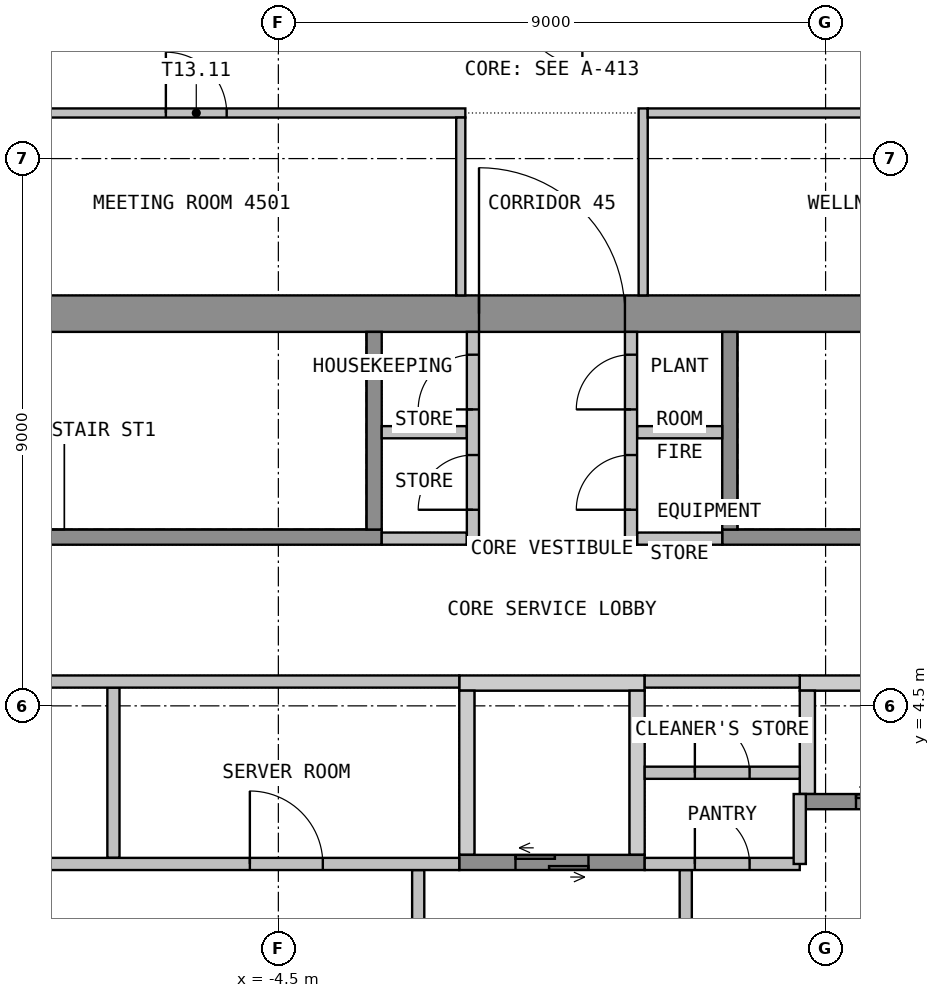
"""IFC4 building model, lengths in metres.
Left out: names, types, materials, properties, quantities, classifications, styles, units other than length and angle.
Written with IfcOpenShell. Run it as: python <this file> out.ifc"""

import sys

from ifc_helpers import new_model, si_unit, direction, frame, frame_2d, origin, place, context, subcontext, project, spatial, polyline, rectangle, outline, extrude, element, fill, save


model = new_model("IFC4")
c1 = context("Model", 3, precision=1e-05, world=origin(), true_north=direction((0.0, 1.0)))
c2 = subcontext(c1, "Body", "Model", "MODEL_VIEW")
j1 = project(units=[si_unit("LENGTHUNIT", "METRE"), si_unit("PLANEANGLEUNIT", "RADIAN")], contexts=[c1])
p1 = place(None, origin())
s1 = spatial("IfcSite", under=j1, at=p1, CompositionType="ELEMENT")
p2 = place(p1, origin())
s2 = spatial("IfcBuilding", under=s1, at=p2, CompositionType="ELEMENT")
p3 = place(p2, frame((0.0, 0.0, 183.9)))
s3 = spatial("IfcBuildingStorey", under=s2, at=p3, CompositionType="ELEMENT", Elevation=183.9)
p4 = place(p3, frame((-13.5, 10.95, 0.0), z_axis=(0.0, 0.0, 1.0), x_axis=(1.0, 0.0, 0.0)))
e1 = element("IfcWall", 1, at=p4, inside=s3, PredefinedType="SHEAR", context=c2, shape_type="SweptSolid", body=[
    extrude(rectangle(XDim=27.0, YDim=0.6, at=frame_2d((13.5, 0.0))), origin(), (0.0, 0.0, 1.0), 3.55),
])
p5 = place(p4, frame((12.3, 0.0, 0.0)))
e2 = element("IfcOpeningElement", 2, at=p5, cuts=e1, PredefinedType="OPENING", context=c2, shape_type="SweptSolid", body=[
    extrude(rectangle(XDim=2.4, YDim=2.1, at=frame_2d((1.2, 1.05))), frame((0.0, 0.31, 0.0), z_axis=(0.0, -1.0, 0.0), x_axis=(1.0, 0.0, 0.0)), (0.0, 0.0, 1.0), 0.62),
])
p6 = place(p4, frame((1.05, 0.0, 0.0)))
e3 = element("IfcOpeningElement", 3, at=p6, cuts=e1, PredefinedType="OPENING", context=c2, shape_type="SweptSolid", body=[
    extrude(rectangle(XDim=1.2, YDim=2.1, at=frame_2d((0.6, 1.05))), frame((0.0, 0.31, 0.0), z_axis=(0.0, -1.0, 0.0), x_axis=(1.0, 0.0, 0.0)), (0.0, 0.0, 1.0), 0.62),
])
p7 = place(p4, frame((24.75, 0.0, 0.0)))
e4 = element("IfcOpeningElement", 4, at=p7, cuts=e1, PredefinedType="OPENING", context=c2, shape_type="SweptSolid", body=[
    extrude(rectangle(XDim=1.2, YDim=2.1, at=frame_2d((0.6, 1.05))), frame((0.0, 0.31, 0.0), z_axis=(0.0, -1.0, 0.0), x_axis=(1.0, 0.0, 0.0)), (0.0, 0.0, 1.0), 0.62),
])
p8 = place(p3, origin())
e5 = element("IfcWall", 5, at=p8, inside=s3, PredefinedType="SHEAR", context=c2, shape_type="SweptSolid", body=[
    extrude(outline(polyline([(-1.525, 4.75), (1.525, 4.75), (1.525, 5.0), (-1.525, 5.0), (-1.525, 4.75)])), origin(), (0.0, 0.0, 1.0), 3.55),
])
p9 = place(p3, origin())
e6 = element("IfcWall", 6, at=p9, inside=s3, PredefinedType="SHEAR", context=c2, shape_type="SweptSolid", body=[
    extrude(outline(polyline([(4.075, 4.75), (12.9, 4.75), (12.9, 5.0), (4.075, 5.0), (4.075, 4.75)])), origin(), (0.0, 0.0, 1.0), 3.55),
])
p10 = place(p3, origin())
e7 = element("IfcWall", 7, at=p10, inside=s3, PredefinedType="SHEAR", context=c2, shape_type="SweptSolid", body=[
    extrude(outline(polyline([(-1.525, 2.05), (-1.275, 2.05), (-1.275, 4.75), (-1.525, 4.75), (-1.525, 2.05)])), origin(), (0.0, 0.0, 1.0), 3.55),
])
p11 = place(p3, origin())
e8 = element("IfcWall", 8, at=p11, inside=s3, PredefinedType="SHEAR", context=c2, shape_type="SweptSolid", body=[
    extrude(outline(polyline([(1.275, 2.05), (1.525, 2.05), (1.525, 4.75), (1.275, 4.75), (1.275, 2.05)])), origin(), (0.0, 0.0, 1.0), 3.55),
])
p12 = place(p3, origin())
e9 = element("IfcWall", 9, at=p12, inside=s3, PredefinedType="SHEAR", context=c2, shape_type="SweptSolid", body=[
    extrude(outline(polyline([(4.075, 3.05), (4.325, 3.05), (4.325, 4.75), (4.075, 4.75), (4.075, 3.05)])), origin(), (0.0, 0.0, 1.0), 3.55),
])
p13 = place(p3, frame((-1.525, 1.925, 0.0), z_axis=(0.0, 0.0, 1.0), x_axis=(1.0, 0.0, 0.0)))
e10 = element("IfcWall", 10, at=p13, inside=s3, PredefinedType="SHEAR", context=c2, shape_type="SweptSolid", body=[
    extrude(rectangle(XDim=3.05, YDim=0.25, at=frame_2d((1.525, 0.0))), origin(), (0.0, 0.0, 1.0), 3.55),
])
p14 = place(p13, frame((0.925, 0.0, 0.0)))
e11 = element("IfcOpeningElement", 11, at=p14, cuts=e10, PredefinedType="OPENING", context=c2, shape_type="SweptSolid", body=[
    extrude(rectangle(XDim=1.2, YDim=2.1, at=frame_2d((0.6, 1.05))), frame((0.0, 0.135, 0.0), z_axis=(0.0, -1.0, 0.0), x_axis=(1.0, 0.0, 0.0)), (0.0, 0.0, 1.0), 0.27),
])
p15 = place(p3, frame((4.075, 2.925, 0.0), z_axis=(0.0, 0.0, 1.0), x_axis=(1.0, 0.0, 0.0)))
e12 = element("IfcWall", 12, at=p15, inside=s3, PredefinedType="SHEAR", context=c2, shape_type="SweptSolid", body=[
    extrude(rectangle(XDim=5.85, YDim=0.25, at=frame_2d((2.925, 0.0))), origin(), (0.0, 0.0, 1.0), 3.55),
])
p16 = place(p15, frame((0.925, 0.0, 0.0)))
e13 = element("IfcOpeningElement", 13, at=p16, cuts=e12, PredefinedType="OPENING", context=c2, shape_type="SweptSolid", body=[
    extrude(rectangle(XDim=1.2, YDim=2.1, at=frame_2d((0.6, 1.05))), frame((0.0, 0.135, 0.0), z_axis=(0.0, -1.0, 0.0), x_axis=(1.0, 0.0, 0.0)), (0.0, 0.0, 1.0), 0.27),
])
p17 = place(p15, frame((3.725, 0.0, 0.0)))
e14 = element("IfcOpeningElement", 14, at=p17, cuts=e12, PredefinedType="OPENING", context=c2, shape_type="SweptSolid", body=[
    extrude(rectangle(XDim=1.2, YDim=2.1, at=frame_2d((0.6, 1.05))), frame((0.0, 0.135, 0.0), z_axis=(0.0, -1.0, 0.0), x_axis=(1.0, 0.0, 0.0)), (0.0, 0.0, 1.0), 0.27),
])
p18 = place(p3, frame((-2.2, -1.8, 0.0), z_axis=(0.0, 0.0, 1.0), x_axis=(0.0, 1.0, 0.0)))
e15 = element("IfcWall", 15, at=p18, inside=s3, PredefinedType="PARTITIONING", context=c2, shape_type="SweptSolid", body=[
    extrude(rectangle(XDim=3.6, YDim=0.2, at=frame_2d((1.8, 0.0))), origin(), (0.0, 0.0, 1.0), 3.55),
])
p19 = place(p18, frame((1.2, 0.0, 0.0)))
e16 = element("IfcOpeningElement", 16, at=p19, cuts=e15, PredefinedType="OPENING", context=c2, shape_type="SweptSolid", body=[
    extrude(rectangle(XDim=1.2, YDim=2.1, at=frame_2d((0.6, 1.05))), frame((0.0, 0.11, 0.0), z_axis=(0.0, -1.0, 0.0), x_axis=(1.0, 0.0, 0.0)), (0.0, 0.0, 1.0), 0.22),
])
p20 = place(p3, frame((2.2, -1.8, 0.0), z_axis=(0.0, 0.0, 1.0), x_axis=(0.0, 1.0, 0.0)))
e17 = element("IfcWall", 17, at=p20, inside=s3, PredefinedType="PARTITIONING", context=c2, shape_type="SweptSolid", body=[
    extrude(rectangle(XDim=3.6, YDim=0.2, at=frame_2d((1.8, 0.0))), origin(), (0.0, 0.0, 1.0), 3.55),
])
p21 = place(p20, frame((1.2, 0.0, 0.0)))
e18 = element("IfcOpeningElement", 18, at=p21, cuts=e17, PredefinedType="OPENING", context=c2, shape_type="SweptSolid", body=[
    extrude(rectangle(XDim=1.2, YDim=2.1, at=frame_2d((0.6, 1.05))), frame((0.0, 0.11, 0.0), z_axis=(0.0, -1.0, 0.0), x_axis=(1.0, 0.0, 0.0)), (0.0, 0.0, 1.0), 0.22),
])
p22 = place(p3, frame((-12.9, 7.275, 0.0), z_axis=(0.0, 0.0, 1.0), x_axis=(1.0, 0.0, 0.0)))
e19 = element("IfcWall", 19, at=p22, inside=s3, PredefinedType="SHEAR", context=c2, shape_type="SweptSolid", body=[
    extrude(rectangle(XDim=10.1, YDim=0.25, at=frame_2d((5.05, 0.0))), origin(), (0.0, 0.0, 1.0), 3.55),
])
p23 = place(p22, frame((0.45, 0.0, 0.0)))
e20 = element("IfcOpeningElement", 20, at=p23, cuts=e19, PredefinedType="OPENING", context=c2, shape_type="SweptSolid", body=[
    extrude(rectangle(XDim=1.2, YDim=2.1, at=frame_2d((0.6, 1.05))), frame((0.0, 0.135, 0.0), z_axis=(0.0, -1.0, 0.0), x_axis=(1.0, 0.0, 0.0)), (0.0, 0.0, 1.0), 0.27),
])
p24 = place(p3, frame((-2.925, 7.4, 0.0), z_axis=(0.0, 0.0, 1.0), x_axis=(0.0, 1.0, 0.0)))
e21 = element("IfcWall", 21, at=p24, inside=s3, PredefinedType="SHEAR", context=c2, shape_type="SweptSolid", body=[
    extrude(rectangle(XDim=3.25, YDim=0.25, at=frame_2d((1.625, 0.0))), origin(), (0.0, 0.0, 1.0), 3.55),
])
p25 = place(p3, frame((2.8, 7.275, 0.0), z_axis=(0.0, 0.0, 1.0), x_axis=(1.0, 0.0, 0.0)))
e22 = element("IfcWall", 22, at=p25, inside=s3, PredefinedType="SHEAR", context=c2, shape_type="SweptSolid", body=[
    extrude(rectangle(XDim=10.1, YDim=0.25, at=frame_2d((5.05, 0.0))), origin(), (0.0, 0.0, 1.0), 3.55),
])
p26 = place(p25, frame((8.45, 0.0, 0.0)))
e23 = element("IfcOpeningElement", 23, at=p26, cuts=e22, PredefinedType="OPENING", context=c2, shape_type="SweptSolid", body=[
    extrude(rectangle(XDim=1.2, YDim=2.1, at=frame_2d((0.6, 1.05))), frame((0.0, 0.135, 0.0), z_axis=(0.0, -1.0, 0.0), x_axis=(1.0, 0.0, 0.0)), (0.0, 0.0, 1.0), 0.27),
])
p27 = place(p3, frame((2.925, 7.4, 0.0), z_axis=(0.0, 0.0, 1.0), x_axis=(0.0, 1.0, 0.0)))
e24 = element("IfcWall", 24, at=p27, inside=s3, PredefinedType="SHEAR", context=c2, shape_type="SweptSolid", body=[
    extrude(rectangle(XDim=3.25, YDim=0.25, at=frame_2d((1.625, 0.0))), origin(), (0.0, 0.0, 1.0), 3.55),
])
for number, where, z_axis, x_axis in (
    (25, (-2.8, 7.25, 0.0), (0.0, 0.0, 1.0), (1.0, 0.0, 0.0)),
    (26, (-2.8, 9.0, 0.0), (0.0, 0.0, 1.0), (1.0, 0.0, 0.0)),
    (27, (1.4, 7.25, 0.0), (0.0, 0.0, 1.0), (1.0, 0.0, 0.0)),
    (28, (1.4, 9.0, 0.0), (0.0, 0.0, 1.0), (1.0, 0.0, 0.0)),
):
    element("IfcWall", number, at=place(p3, frame(where, z_axis=z_axis, x_axis=x_axis)), inside=s3, PredefinedType="PARTITIONING", context=c2, shape_type="SweptSolid", body=[
        extrude(rectangle(XDim=1.4, YDim=0.2, at=frame_2d((0.7, 0.0))), origin(), (0.0, 0.0, 1.0), 3.55),
    ])
p28 = place(p3, frame((-1.3, 7.15, 0.0), z_axis=(0.0, 0.0, 1.0), x_axis=(0.0, 1.0, 0.0)))
e29 = element("IfcWall", 29, at=p28, inside=s3, PredefinedType="PARTITIONING", context=c2, shape_type="SweptSolid", body=[
    extrude(rectangle(XDim=3.5, YDim=0.2, at=frame_2d((1.75, 0.0))), origin(), (0.0, 0.0, 1.0), 3.55),
])
p29 = place(p28, frame((0.575, 0.0, 0.0)))
e30 = element("IfcOpeningElement", 30, at=p29, cuts=e29, PredefinedType="OPENING", context=c2, shape_type="SweptSolid", body=[
    extrude(rectangle(XDim=0.9, YDim=2.1, at=frame_2d((0.45, 1.05))), frame((0.0, 0.11, 0.0), z_axis=(0.0, -1.0, 0.0), x_axis=(1.0, 0.0, 0.0)), (0.0, 0.0, 1.0), 0.22),
])
p30 = place(p28, frame((2.225, 0.0, 0.0)))
e31 = element("IfcOpeningElement", 31, at=p30, cuts=e29, PredefinedType="OPENING", context=c2, shape_type="SweptSolid", body=[
    extrude(rectangle(XDim=0.9, YDim=2.1, at=frame_2d((0.45, 1.05))), frame((0.0, 0.11, 0.0), z_axis=(0.0, -1.0, 0.0), x_axis=(1.0, 0.0, 0.0)), (0.0, 0.0, 1.0), 0.22),
])
p31 = place(p3, frame((1.3, 7.15, 0.0), z_axis=(0.0, 0.0, 1.0), x_axis=(0.0, 1.0, 0.0)))
e32 = element("IfcWall", 32, at=p31, inside=s3, PredefinedType="PARTITIONING", context=c2, shape_type="SweptSolid", body=[
    extrude(rectangle(XDim=3.5, YDim=0.2, at=frame_2d((1.75, 0.0))), origin(), (0.0, 0.0, 1.0), 3.55),
])
p32 = place(p31, frame((0.575, 0.0, 0.0)))
e33 = element("IfcOpeningElement", 33, at=p32, cuts=e32, PredefinedType="OPENING", context=c2, shape_type="SweptSolid", body=[
    extrude(rectangle(XDim=0.9, YDim=2.1, at=frame_2d((0.45, 1.05))), frame((0.0, 0.11, 0.0), z_axis=(0.0, -1.0, 0.0), x_axis=(1.0, 0.0, 0.0)), (0.0, 0.0, 1.0), 0.22),
])
p33 = place(p31, frame((2.225, 0.0, 0.0)))
e34 = element("IfcOpeningElement", 34, at=p33, cuts=e32, PredefinedType="OPENING", context=c2, shape_type="SweptSolid", body=[
    extrude(rectangle(XDim=0.9, YDim=2.1, at=frame_2d((0.45, 1.05))), frame((0.0, 0.11, 0.0), z_axis=(0.0, -1.0, 0.0), x_axis=(1.0, 0.0, 0.0)), (0.0, 0.0, 1.0), 0.22),
])
p34 = place(p3, frame((-7.212, 2.0, 0.0), z_axis=(0.0, 0.0, 1.0), x_axis=(0.0, 1.0, 0.0)))
e35 = element("IfcWall", 35, at=p34, inside=s3, PredefinedType="PARTITIONING", context=c2, shape_type="SweptSolid", body=[
    extrude(rectangle(XDim=2.8, YDim=0.2, at=frame_2d((1.4, 0.0))), origin(), (0.0, 0.0, 1.0), 3.55),
])
p35 = place(p3, frame((-12.9, 1.9, 0.0), z_axis=(0.0, 0.0, 1.0), x_axis=(1.0, 0.0, 0.0)))
e36 = element("IfcWall", 36, at=p35, inside=s3, PredefinedType="PARTITIONING", context=c2, shape_type="SweptSolid", body=[
    extrude(rectangle(XDim=11.375, YDim=0.2, at=frame_2d((5.688, 0.0))), origin(), (0.0, 0.0, 1.0), 3.55),
])
p36 = place(p35, frame((2.244, 0.0, 0.0)))
e37 = element("IfcOpeningElement", 37, at=p36, cuts=e36, PredefinedType="OPENING", context=c2, shape_type="SweptSolid", body=[
    extrude(rectangle(XDim=1.2, YDim=2.1, at=frame_2d((0.6, 1.05))), frame((0.0, 0.11, 0.0), z_axis=(0.0, -1.0, 0.0), x_axis=(1.0, 0.0, 0.0)), (0.0, 0.0, 1.0), 0.22),
])
p37 = place(p35, frame((7.931, 0.0, 0.0)))
e38 = element("IfcOpeningElement", 38, at=p37, cuts=e36, PredefinedType="OPENING", context=c2, shape_type="SweptSolid", body=[
    extrude(rectangle(XDim=1.2, YDim=2.1, at=frame_2d((0.6, 1.05))), frame((0.0, 0.11, 0.0), z_axis=(0.0, -1.0, 0.0), x_axis=(1.0, 0.0, 0.0)), (0.0, 0.0, 1.0), 0.22),
])
p38 = place(p3, frame((-12.9, 4.9, 0.0), z_axis=(0.0, 0.0, 1.0), x_axis=(1.0, 0.0, 0.0)))
e39 = element("IfcWall", 39, at=p38, inside=s3, PredefinedType="PARTITIONING", context=c2, shape_type="SweptSolid", body=[
    extrude(rectangle(XDim=11.375, YDim=0.2, at=frame_2d((5.688, 0.0))), origin(), (0.0, 0.0, 1.0), 3.55),
])
p39 = place(p3, frame((1.525, 3.4, 0.0), z_axis=(0.0, 0.0, 1.0), x_axis=(1.0, 0.0, 0.0)))
e40 = element("IfcWall", 40, at=p39, inside=s3, PredefinedType="PARTITIONING", context=c2, shape_type="SweptSolid", body=[
    extrude(rectangle(XDim=2.55, YDim=0.2, at=frame_2d((1.275, 0.0))), origin(), (0.0, 0.0, 1.0), 3.55),
])
p40 = place(p39, frame((0.825, 0.0, 0.0)))
e41 = element("IfcOpeningElement", 41, at=p40, cuts=e40, PredefinedType="OPENING", context=c2, shape_type="SweptSolid", body=[
    extrude(rectangle(XDim=0.9, YDim=2.1, at=frame_2d((0.45, 1.05))), frame((0.0, 0.11, 0.0), z_axis=(0.0, -1.0, 0.0), x_axis=(1.0, 0.0, 0.0)), (0.0, 0.0, 1.0), 0.22),
])
p41 = place(p3, frame((1.525, 1.9, 0.0), z_axis=(0.0, 0.0, 1.0), x_axis=(1.0, 0.0, 0.0)))
e42 = element("IfcWall", 42, at=p41, inside=s3, PredefinedType="PARTITIONING", context=c2, shape_type="SweptSolid", body=[
    extrude(rectangle(XDim=2.55, YDim=0.2, at=frame_2d((1.275, 0.0))), origin(), (0.0, 0.0, 1.0), 3.55),
])
p42 = place(p41, frame((0.825, 0.0, 0.0)))
e43 = element("IfcOpeningElement", 43, at=p42, cuts=e42, PredefinedType="OPENING", context=c2, shape_type="SweptSolid", body=[
    extrude(rectangle(XDim=0.9, YDim=2.1, at=frame_2d((0.45, 1.05))), frame((0.0, 0.11, 0.0), z_axis=(0.0, -1.0, 0.0), x_axis=(1.0, 0.0, 0.0)), (0.0, 0.0, 1.0), 0.22),
])
p43 = place(p3, frame((1.525, 4.9, 0.0), z_axis=(0.0, 0.0, 1.0), x_axis=(1.0, 0.0, 0.0)))
e44 = element("IfcWall", 44, at=p43, inside=s3, PredefinedType="PARTITIONING", context=c2, shape_type="SweptSolid", body=[
    extrude(rectangle(XDim=2.55, YDim=0.2, at=frame_2d((1.275, 0.0))), origin(), (0.0, 0.0, 1.0), 3.55),
])
p44 = place(p3, frame((4.075, 1.9, 0.0), z_axis=(0.0, 0.0, 1.0), x_axis=(0.0, 1.0, 0.0)))
e45 = element("IfcWall", 45, at=p44, inside=s3, PredefinedType="PARTITIONING", context=c2, shape_type="SweptSolid", body=[
    extrude(rectangle(XDim=1.15, YDim=0.2, at=frame_2d((0.575, 0.0))), origin(), (0.0, 0.0, 1.0), 3.55),
])
p45 = place(p3, frame((-10.275, 14.25, 0.0), z_axis=(0.0, 0.0, 1.0), x_axis=(1.0, 0.0, 0.0)))
e46 = element("IfcWall", 46, at=p45, inside=s3, PredefinedType="PARTITIONING", context=c2, shape_type="SweptSolid", body=[
    extrude(rectangle(XDim=8.85, YDim=0.15, at=frame_2d((4.425, 0.0))), origin(), (0.0, 0.0, 1.0), 3.55),
])
p46 = place(p45, frame((3.925, 0.0, 0.0)))
e47 = element("IfcOpeningElement", 47, at=p46, cuts=e46, PredefinedType="OPENING", context=c2, shape_type="SweptSolid", body=[
    extrude(rectangle(XDim=1.0, YDim=2.1, at=frame_2d((0.5, 1.05))), frame((0.0, 0.085, 0.0), z_axis=(0.0, -1.0, 0.0), x_axis=(1.0, 0.0, 0.0)), (0.0, 0.0, 1.0), 0.17),
])
p47 = place(p3, frame((-1.5, 14.175, 0.0), z_axis=(0.0, 0.0, 1.0), x_axis=(0.0, -1.0, 0.0)))
e48 = element("IfcWall", 48, at=p47, inside=s3, PredefinedType="PARTITIONING", context=c2, shape_type="SweptSolid", body=[
    extrude(rectangle(XDim=2.925, YDim=0.15, at=frame_2d((1.462, 0.0))), origin(), (0.0, 0.0, 1.0), 3.55),
])
p48 = place(p3, frame((1.5, 11.25, 0.0), z_axis=(0.0, 0.0, 1.0), x_axis=(0.0, 1.0, 0.0)))
e49 = element("IfcWall", 49, at=p48, inside=s3, PredefinedType="PARTITIONING", context=c2, shape_type="SweptSolid", body=[
    extrude(rectangle(XDim=3.075, YDim=0.15, at=frame_2d((1.538, 0.0))), origin(), (0.0, 0.0, 1.0), 3.55),
])
p49 = place(p3, frame((1.575, 14.25, 0.0), z_axis=(0.0, 0.0, 1.0), x_axis=(1.0, 0.0, 0.0)))
e50 = element("IfcWall", 50, at=p49, inside=s3, PredefinedType="PARTITIONING", context=c2, shape_type="SweptSolid", body=[
    extrude(rectangle(XDim=8.85, YDim=0.15, at=frame_2d((4.425, 0.0))), origin(), (0.0, 0.0, 1.0), 3.55),
])
p50 = place(p49, frame((3.925, 0.0, 0.0)))
e51 = element("IfcOpeningElement", 51, at=p50, cuts=e50, PredefinedType="OPENING", context=c2, shape_type="SweptSolid", body=[
    extrude(rectangle(XDim=1.0, YDim=2.1, at=frame_2d((0.5, 1.05))), frame((0.0, 0.085, 0.0), z_axis=(0.0, -1.0, 0.0), x_axis=(1.0, 0.0, 0.0)), (0.0, 0.0, 1.0), 0.17),
])
p51 = place(p5, origin())
e52 = element("IfcDoor", 52, at=p51, inside=s3, OperationType="DOUBLE_DOOR_DOUBLE_SWING", PredefinedType="DOOR", context=c2, shape_type="SweptSolid", body=[
    extrude(rectangle(XDim=2.4, YDim=2.1, at=frame_2d((1.2, 1.05))), frame((0.0, 0.025, 0.0), z_axis=(0.0, -1.0, 0.0), x_axis=(1.0, 0.0, 0.0)), (0.0, 0.0, 1.0), 0.05),
])
fill(e2, e52)
p52 = place(p14, origin())
e53 = element("IfcDoor", 53, at=p52, inside=s3, OperationType="DOUBLE_DOOR_SLIDING", PredefinedType="DOOR", context=c2, shape_type="SweptSolid", body=[
    extrude(rectangle(XDim=1.2, YDim=2.1, at=frame_2d((0.6, 1.05))), frame((0.0, 0.025, 0.0), z_axis=(0.0, -1.0, 0.0), x_axis=(1.0, 0.0, 0.0)), (0.0, 0.0, 1.0), 0.05),
])
fill(e11, e53)
p53 = place(p16, origin())
e54 = element("IfcDoor", 54, at=p53, inside=s3, OperationType="DOUBLE_DOOR_SLIDING", PredefinedType="DOOR", context=c2, shape_type="SweptSolid", body=[
    extrude(rectangle(XDim=1.2, YDim=2.1, at=frame_2d((0.6, 1.05))), frame((0.0, 0.025, 0.0), z_axis=(0.0, -1.0, 0.0), x_axis=(1.0, 0.0, 0.0)), (0.0, 0.0, 1.0), 0.05),
])
fill(e13, e54)
p54 = place(p29, origin())
e55 = element("IfcDoor", 55, at=p54, inside=s3, OperationType="SINGLE_SWING_LEFT", PredefinedType="DOOR", context=c2, shape_type="SweptSolid", body=[
    extrude(rectangle(XDim=0.9, YDim=2.1, at=frame_2d((0.45, 1.05))), frame((0.0, 0.025, 0.0), z_axis=(0.0, -1.0, 0.0), x_axis=(1.0, 0.0, 0.0)), (0.0, 0.0, 1.0), 0.05),
])
fill(e30, e55)
p55 = place(p30, origin())
e56 = element("IfcDoor", 56, at=p55, inside=s3, OperationType="SINGLE_SWING_LEFT", PredefinedType="DOOR", context=c2, shape_type="SweptSolid", body=[
    extrude(rectangle(XDim=0.9, YDim=2.1, at=frame_2d((0.45, 1.05))), frame((0.0, 0.025, 0.0), z_axis=(0.0, -1.0, 0.0), x_axis=(1.0, 0.0, 0.0)), (0.0, 0.0, 1.0), 0.05),
])
fill(e31, e56)
p56 = place(p32, origin())
e57 = element("IfcDoor", 57, at=p56, inside=s3, OperationType="SINGLE_SWING_LEFT", PredefinedType="DOOR", context=c2, shape_type="SweptSolid", body=[
    extrude(rectangle(XDim=0.9, YDim=2.1, at=frame_2d((0.45, 1.05))), frame((0.0, 0.025, 0.0), z_axis=(0.0, -1.0, 0.0), x_axis=(1.0, 0.0, 0.0)), (0.0, 0.0, 1.0), 0.05),
])
fill(e33, e57)
p57 = place(p33, origin())
e58 = element("IfcDoor", 58, at=p57, inside=s3, OperationType="SINGLE_SWING_LEFT", PredefinedType="DOOR", context=c2, shape_type="SweptSolid", body=[
    extrude(rectangle(XDim=0.9, YDim=2.1, at=frame_2d((0.45, 1.05))), frame((0.0, 0.025, 0.0), z_axis=(0.0, -1.0, 0.0), x_axis=(1.0, 0.0, 0.0)), (0.0, 0.0, 1.0), 0.05),
])
fill(e34, e58)
p58 = place(p37, origin())
e59 = element("IfcDoor", 59, at=p58, inside=s3, OperationType="SINGLE_SWING_RIGHT", PredefinedType="DOOR", context=c2, shape_type="SweptSolid", body=[
    extrude(rectangle(XDim=1.2, YDim=2.1, at=frame_2d((0.6, 1.05))), frame((0.0, 0.025, 0.0), z_axis=(0.0, -1.0, 0.0), x_axis=(1.0, 0.0, 0.0)), (0.0, 0.0, 1.0), 0.05),
])
fill(e38, e59)
p59 = place(p40, origin())
e60 = element("IfcDoor", 60, at=p59, inside=s3, OperationType="SINGLE_SWING_LEFT", PredefinedType="DOOR", context=c2, shape_type="SweptSolid", body=[
    extrude(rectangle(XDim=0.9, YDim=2.1, at=frame_2d((0.45, 1.05))), frame((0.0, 0.025, 0.0), z_axis=(0.0, -1.0, 0.0), x_axis=(1.0, 0.0, 0.0)), (0.0, 0.0, 1.0), 0.05),
])
fill(e41, e60)
p60 = place(p42, origin())
e61 = element("IfcDoor", 61, at=p60, inside=s3, OperationType="SINGLE_SWING_LEFT", PredefinedType="DOOR", context=c2, shape_type="SweptSolid", body=[
    extrude(rectangle(XDim=0.9, YDim=2.1, at=frame_2d((0.45, 1.05))), frame((0.0, 0.025, 0.0), z_axis=(0.0, -1.0, 0.0), x_axis=(1.0, 0.0, 0.0)), (0.0, 0.0, 1.0), 0.05),
])
fill(e43, e61)
p61 = place(p46, origin())
e62 = element("IfcDoor", 62, at=p61, inside=s3, OperationType="SINGLE_SWING_LEFT", PredefinedType="DOOR", context=c2, shape_type="SweptSolid", body=[
    extrude(rectangle(XDim=1.0, YDim=2.1, at=frame_2d((0.5, 1.05))), frame((0.0, 0.025, 0.0), z_axis=(0.0, -1.0, 0.0), x_axis=(1.0, 0.0, 0.0)), (0.0, 0.0, 1.0), 0.05),
])
fill(e47, e62)
save(model, sys.argv[1])
